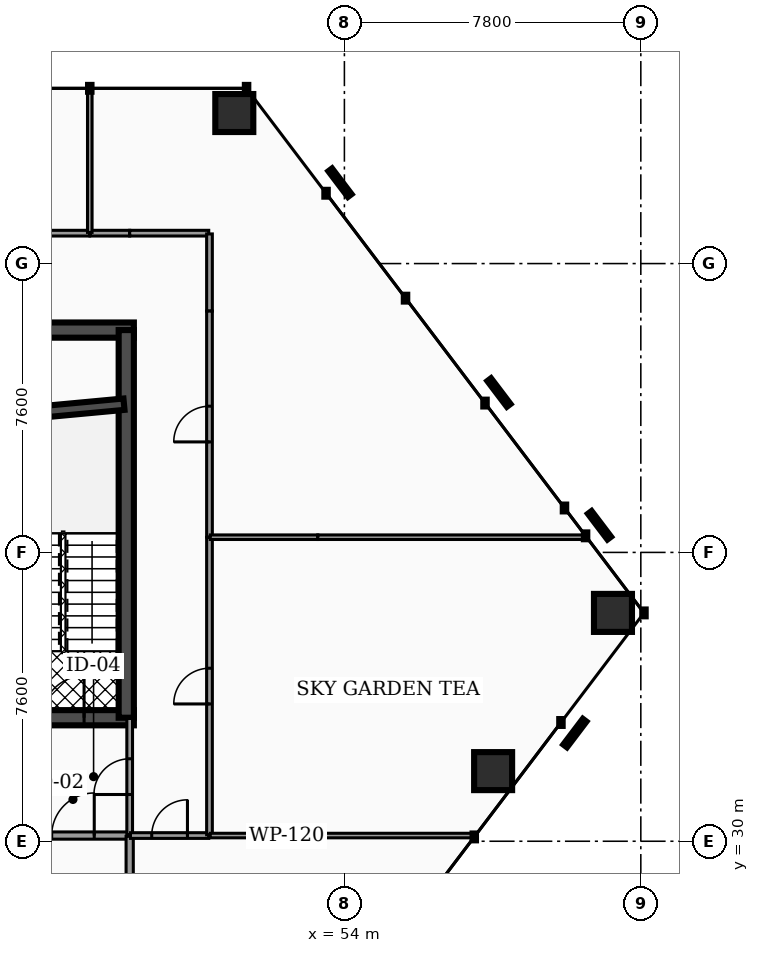
"""IFC4 building model, lengths in metres.
Left out: names, types, materials, properties, quantities, classifications, styles, units other than length and angle.
Written with IfcOpenShell. Run it as: python <this file> out.ifc"""

import sys

from ifc_helpers import new_model, si_unit, direction, frame, frame_2d, origin, origin_2d, place, context, subcontext, project, spatial, rectangle, hollow_rectangle, extrude, element, fill, save


model = new_model("IFC4")
c1 = context("Model", 3, precision=1e-05, world=origin(), true_north=direction((0.0, 1.0)))
c2 = subcontext(c1, "Body", "Model", "MODEL_VIEW")
j1 = project(units=[si_unit("LENGTHUNIT", "METRE"), si_unit("PLANEANGLEUNIT", "RADIAN")], contexts=[c1])
p1 = place(None, origin())
s1 = spatial("IfcSite", under=j1, at=p1, CompositionType="ELEMENT")
p2 = place(p1, origin())
s2 = spatial("IfcBuilding", under=s1, at=p2, CompositionType="ELEMENT")
p3 = place(p2, frame((0.0, 0.0, 64.26)))
s3 = spatial("IfcBuildingStorey", under=s2, at=p3, CompositionType="ELEMENT", Elevation=64.26)
p4 = place(p3, frame((28.4, 43.45, 0.0), z_axis=(0.0, 0.0, 1.0), x_axis=(1.0, 0.0, 0.0)))
e1 = element("IfcWall", 1, at=p4, inside=s3, PredefinedType="SHEAR", context=c2, shape_type="SweptSolid", body=[
    extrude(rectangle(XDim=20.06, YDim=0.4, at=frame_2d((10.03, 0.0))), origin(), (0.0, 0.0, 1.0), 3.82),
])
p5 = place(p3, frame((28.4, 33.25, 0.0), z_axis=(0.0, 0.0, 1.0), x_axis=(1.0, 0.0, 0.0)))
e2 = element("IfcWall", 2, at=p5, inside=s3, PredefinedType="SHEAR", context=c2, shape_type="SweptSolid", body=[
    extrude(rectangle(XDim=20.06, YDim=0.4, at=frame_2d((10.03, 0.0))), origin(), (0.0, 0.0, 1.0), 3.82),
])
p6 = place(p5, frame((4.03, 0.0, 0.0)))
e3 = element("IfcOpeningElement", 3, at=p6, cuts=e2, PredefinedType="OPENING", context=c2, shape_type="SweptSolid", body=[
    extrude(rectangle(XDim=1.1, YDim=2.15, at=frame_2d((0.55, 1.075))), frame((0.0, 0.21, 0.0), z_axis=(0.0, -1.0, 0.0), x_axis=(1.0, 0.0, 0.0)), (0.0, 0.0, 1.0), 0.42),
])
p7 = place(p5, frame((14.87, 0.0, 0.0)))
e4 = element("IfcOpeningElement", 4, at=p7, cuts=e2, PredefinedType="OPENING", context=c2, shape_type="SweptSolid", body=[
    extrude(rectangle(XDim=1.1, YDim=2.15, at=frame_2d((0.55, 1.075))), frame((0.0, 0.21, 0.0), z_axis=(0.0, -1.0, 0.0), x_axis=(1.0, 0.0, 0.0)), (0.0, 0.0, 1.0), 0.42),
])
p8 = place(p5, frame((1.31, 0.0, 0.0)))
e5 = element("IfcOpeningElement", 5, at=p8, cuts=e2, PredefinedType="OPENING", context=c2, shape_type="SweptSolid", body=[
    extrude(rectangle(XDim=1.1, YDim=2.2, at=frame_2d((0.55, 1.1))), frame((0.0, 0.21, 0.0), z_axis=(0.0, -1.0, 0.0), x_axis=(1.0, 0.0, 0.0)), (0.0, 0.0, 1.0), 0.42),
])
p9 = place(p5, frame((9.44, 0.0, 0.0)))
e6 = element("IfcOpeningElement", 6, at=p9, cuts=e2, PredefinedType="OPENING", context=c2, shape_type="SweptSolid", body=[
    extrude(rectangle(XDim=1.12, YDim=2.05, at=frame_2d((0.56, 1.025))), frame((0.0, 0.21, 0.0), z_axis=(0.0, -1.0, 0.0), x_axis=(1.0, 0.0, 0.0)), (0.0, 0.0, 1.0), 0.42),
])
p10 = place(p5, frame((17.65, 0.0, 0.0)))
e7 = element("IfcOpeningElement", 7, at=p10, cuts=e2, PredefinedType="OPENING", context=c2, shape_type="SweptSolid", body=[
    extrude(rectangle(XDim=1.1, YDim=2.2, at=frame_2d((0.55, 1.1))), frame((0.0, 0.21, 0.0), z_axis=(0.0, -1.0, 0.0), x_axis=(1.0, 0.0, 0.0)), (0.0, 0.0, 1.0), 0.42),
])
p11 = place(p3, frame((48.26, 33.25, 0.0), z_axis=(0.0, 0.0, 1.0), x_axis=(0.0, 1.0, 0.0)))
e8 = element("IfcWall", 8, at=p11, inside=s3, PredefinedType="SHEAR", context=c2, shape_type="SweptSolid", body=[
    extrude(rectangle(XDim=10.2, YDim=0.4, at=frame_2d((5.1, 0.0))), origin(), (0.0, 0.0, 1.0), 3.82),
])
p12 = place(p3, frame((44.98, 41.2, 0.0), z_axis=(0.0, 0.0, 1.0), x_axis=(0.995686468965, 0.09278176286, 0.0)))
e9 = element("IfcWall", 9, at=p12, inside=s3, PredefinedType="SHEAR", context=c2, shape_type="SweptSolid", body=[
    extrude(rectangle(XDim=3.234, YDim=0.3, at=frame_2d((1.617, 0.0))), origin(), (0.0, 0.0, 1.0), 3.82),
])
for number, where, z_axis, x_axis in (
    (10, (51.103, 49.161, 0.0), (0.0, 0.0, 1.0), (1.0, 0.0, 0.0)),
    (11, (57.914, 31.845, 0.0), (0.0, 0.0, 1.0), (1.0, 0.0, 0.0)),
    (12, (61.067, 36.008, 0.0), (0.0, 0.0, 1.0), (1.0, 0.0, 0.0)),
):
    element("IfcColumn", number, at=place(p3, frame(where, z_axis=z_axis, x_axis=x_axis)), inside=s3, PredefinedType="COLUMN", context=c2, shape_type="SweptSolid", body=[
        extrude(hollow_rectangle(XDim=1.0, YDim=1.0, WallThickness=0.05, at=origin_2d()), origin(), (0.0, 0.0, 1.0), 3.82),
    ])
p13 = place(p3, frame((45.385, 30.15, 0.0), z_axis=(0.0, 0.0, 1.0), x_axis=(1.0, 0.0, 0.0)))
e13 = element("IfcWall", 13, at=p13, inside=s3, PredefinedType="PARTITIONING", context=c2, shape_type="SweptSolid", body=[
    extrude(rectangle(XDim=2.945, YDim=0.19, at=frame_2d((1.473, 0.0))), origin(), (0.0, 0.0, 1.0), 2.777),
])
p14 = place(p13, frame((0.913, 0.0, 0.0)))
e14 = element("IfcOpeningElement", 14, at=p14, cuts=e13, PredefinedType="OPENING", context=c2, shape_type="SweptSolid", body=[
    extrude(rectangle(XDim=1.12, YDim=2.05, at=frame_2d((0.56, 1.025))), frame((0.0, 0.105, 0.0), z_axis=(0.0, -1.0, 0.0), x_axis=(1.0, 0.0, 0.0)), (0.0, 0.0, 1.0), 0.21),
])
p15 = place(p3, frame((48.35, 30.17, 0.0), z_axis=(0.0, 0.0, 1.0), x_axis=(0.0, 1.0, 0.0)))
e15 = element("IfcWall", 15, at=p15, inside=s3, PredefinedType="PARTITIONING", context=c2, shape_type="SweptSolid", body=[
    extrude(rectangle(XDim=3.06, YDim=0.15, at=frame_2d((1.53, 0.0))), origin(), (0.0, 0.0, 1.0), 2.777),
])
p16 = place(p15, frame((1.06, 0.0, 0.0)))
e16 = element("IfcOpeningElement", 16, at=p16, cuts=e15, PredefinedType="OPENING", context=c2, shape_type="SweptSolid", body=[
    extrude(rectangle(XDim=0.94, YDim=2.05, at=frame_2d((0.47, 1.025))), frame((0.0, 0.085, 0.0), z_axis=(0.0, -1.0, 0.0), x_axis=(1.0, 0.0, 0.0)), (0.0, 0.0, 1.0), 0.17),
])
p17 = place(p3, frame((48.35, 27.37, 0.0), z_axis=(0.0, 0.0, 1.0), x_axis=(0.0, 1.0, 0.0)))
e17 = element("IfcWall", 17, at=p17, inside=s3, PredefinedType="PARTITIONING", context=c2, shape_type="SweptSolid", body=[
    extrude(rectangle(XDim=2.76, YDim=0.19, at=frame_2d((1.38, 0.0))), origin(), (0.0, 0.0, 1.0), 2.777),
])
p18 = place(p3, frame((48.37, 30.15, 0.0), z_axis=(0.0, 0.0, 1.0), x_axis=(1.0, 0.0, 0.0)))
e18 = element("IfcWall", 18, at=p18, inside=s3, PredefinedType="PARTITIONING", context=c2, shape_type="SweptSolid", body=[
    extrude(rectangle(XDim=2.06, YDim=0.15, at=frame_2d((1.03, 0.0))), origin(), (0.0, 0.0, 1.0), 2.777),
])
p19 = place(p18, frame((0.56, 0.0, 0.0)))
e19 = element("IfcOpeningElement", 19, at=p19, cuts=e18, PredefinedType="OPENING", context=c2, shape_type="SweptSolid", body=[
    extrude(rectangle(XDim=0.94, YDim=2.05, at=frame_2d((0.47, 1.025))), frame((0.0, 0.085, 0.0), z_axis=(0.0, -1.0, 0.0), x_axis=(1.0, 0.0, 0.0)), (0.0, 0.0, 1.0), 0.17),
])
p20 = place(p3, frame((50.45, 30.17, 0.0), z_axis=(0.0, 0.0, 1.0), x_axis=(0.0, 1.0, 0.0)))
e20 = element("IfcWall", 20, at=p20, inside=s3, PredefinedType="PARTITIONING", context=c2, shape_type="SweptSolid", body=[
    extrude(rectangle(XDim=7.825, YDim=0.15, at=frame_2d((3.913, 0.0))), origin(), (0.0, 0.0, 1.0), 2.777),
])
p21 = place(p20, frame((3.442, 0.0, 0.0)))
e21 = element("IfcOpeningElement", 21, at=p21, cuts=e20, PredefinedType="OPENING", context=c2, shape_type="SweptSolid", body=[
    extrude(rectangle(XDim=0.94, YDim=2.05, at=frame_2d((0.47, 1.025))), frame((0.0, 0.085, 0.0), z_axis=(0.0, -1.0, 0.0), x_axis=(1.0, 0.0, 0.0)), (0.0, 0.0, 1.0), 0.17),
])
p22 = place(p3, frame((47.305, 46.0, 0.0), z_axis=(0.0, 0.0, 1.0), x_axis=(1.0, 0.0, 0.0)))
e22 = element("IfcWall", 22, at=p22, inside=s3, PredefinedType="PARTITIONING", context=c2, shape_type="SweptSolid", body=[
    extrude(rectangle(XDim=1.045, YDim=0.15, at=frame_2d((0.522, 0.0))), origin(), (0.0, 0.0, 1.0), 2.777),
])
p23 = place(p3, frame((48.35, 46.0, 0.0), z_axis=(0.0, 0.0, 1.0), x_axis=(1.0, 0.0, 0.0)))
e23 = element("IfcWall", 23, at=p23, inside=s3, PredefinedType="PARTITIONING", context=c2, shape_type="SweptSolid", body=[
    extrude(rectangle(XDim=2.08, YDim=0.15, at=frame_2d((1.04, 0.0))), origin(), (0.0, 0.0, 1.0), 2.777),
])
p24 = place(p3, frame((50.45, 43.95, 0.0), z_axis=(0.0, 0.0, 1.0), x_axis=(0.0, 1.0, 0.0)))
e24 = element("IfcWall", 24, at=p24, inside=s3, PredefinedType="PARTITIONING", context=c2, shape_type="SweptSolid", body=[
    extrude(rectangle(XDim=2.03, YDim=0.15, at=frame_2d((1.015, 0.0))), origin(), (0.0, 0.0, 1.0), 2.777),
])
p25 = place(p3, frame((50.45, 38.005, 0.0), z_axis=(0.0, 0.0, 1.0), x_axis=(0.0, 1.0, 0.0)))
e25 = element("IfcWall", 25, at=p25, inside=s3, PredefinedType="PARTITIONING", context=c2, shape_type="SweptSolid", body=[
    extrude(rectangle(XDim=5.945, YDim=0.15, at=frame_2d((2.973, 0.0))), origin(), (0.0, 0.0, 1.0), 2.777),
])
p26 = place(p25, frame((2.502, 0.0, 0.0)))
e26 = element("IfcOpeningElement", 26, at=p26, cuts=e25, PredefinedType="OPENING", context=c2, shape_type="SweptSolid", body=[
    extrude(rectangle(XDim=0.94, YDim=2.05, at=frame_2d((0.47, 1.025))), frame((0.0, 0.085, 0.0), z_axis=(0.0, -1.0, 0.0), x_axis=(1.0, 0.0, 0.0)), (0.0, 0.0, 1.0), 0.17),
])
p27 = place(p3, frame((42.605, 46.0, 0.0), z_axis=(0.0, 0.0, 1.0), x_axis=(1.0, 0.0, 0.0)))
e27 = element("IfcWall", 27, at=p27, inside=s3, PredefinedType="PARTITIONING", context=c2, shape_type="SweptSolid", body=[
    extrude(rectangle(XDim=4.69, YDim=0.15, at=frame_2d((2.345, 0.0))), origin(), (0.0, 0.0, 1.0), 2.777),
])
p28 = place(p27, frame((1.875, 0.0, 0.0)))
e28 = element("IfcOpeningElement", 28, at=p28, cuts=e27, PredefinedType="OPENING", context=c2, shape_type="SweptSolid", body=[
    extrude(rectangle(XDim=0.94, YDim=2.05, at=frame_2d((0.47, 1.025))), frame((0.0, 0.085, 0.0), z_axis=(0.0, -1.0, 0.0), x_axis=(1.0, 0.0, 0.0)), (0.0, 0.0, 1.0), 0.17),
])
p29 = place(p3, frame((50.47, 30.15, 0.0), z_axis=(0.0, 0.0, 1.0), x_axis=(1.0, 0.0, 0.0)))
e29 = element("IfcWall", 29, at=p29, inside=s3, PredefinedType="PARTITIONING", context=c2, shape_type="SweptSolid", body=[
    extrude(rectangle(XDim=2.83, YDim=0.12, at=frame_2d((1.415, 0.0))), origin(), (0.0, 0.0, 1.0), 2.777),
])
p30 = place(p3, frame((53.3, 30.15, 0.0), z_axis=(0.0, 0.0, 1.0), x_axis=(1.0, 0.0, 0.0)))
e30 = element("IfcWall", 30, at=p30, inside=s3, PredefinedType="PARTITIONING", context=c2, shape_type="SweptSolid", body=[
    extrude(rectangle(XDim=4.13, YDim=0.12, at=frame_2d((2.065, 0.0))), origin(), (0.0, 0.0, 1.0), 2.777),
])
p31 = place(p3, frame((50.47, 38.0, 0.0), z_axis=(0.0, 0.0, 1.0), x_axis=(1.0, 0.0, 0.0)))
e31 = element("IfcWall", 31, at=p31, inside=s3, PredefinedType="PARTITIONING", context=c2, shape_type="SweptSolid", body=[
    extrude(rectangle(XDim=2.83, YDim=0.12, at=frame_2d((1.415, 0.0))), origin(), (0.0, 0.0, 1.0), 2.777),
])
p32 = place(p3, frame((53.3, 38.0, 0.0), z_axis=(0.0, 0.0, 1.0), x_axis=(1.0, 0.0, 0.0)))
e32 = element("IfcWall", 32, at=p32, inside=s3, PredefinedType="PARTITIONING", context=c2, shape_type="SweptSolid", body=[
    extrude(rectangle(XDim=7.059, YDim=0.12, at=frame_2d((3.529, 0.0))), origin(), (0.0, 0.0, 1.0), 2.777),
])
p33 = place(p3, frame((47.3, 46.02, 0.0), z_axis=(0.0, 0.0, 1.0), x_axis=(0.0, 1.0, 0.0)))
e33 = element("IfcWall", 33, at=p33, inside=s3, PredefinedType="PARTITIONING", context=c2, shape_type="SweptSolid", body=[
    extrude(rectangle(XDim=3.776, YDim=0.12, at=frame_2d((1.888, 0.0))), origin(), (0.0, 0.0, 1.0), 2.777),
])
p34 = place(p10, origin())
e34 = element("IfcDoor", 34, at=p34, inside=s3, OperationType="SINGLE_SWING_RIGHT", PredefinedType="DOOR", context=c2, shape_type="SweptSolid", body=[
    extrude(rectangle(XDim=1.1, YDim=2.2, at=frame_2d((0.55, 1.1))), frame((0.0, 0.025, 0.0), z_axis=(0.0, -1.0, 0.0), x_axis=(1.0, 0.0, 0.0)), (0.0, 0.0, 1.0), 0.05),
])
fill(e7, e34)
p35 = place(p14, origin())
e35 = element("IfcDoor", 35, at=p35, inside=s3, OperationType="SINGLE_SWING_RIGHT", PredefinedType="DOOR", context=c2, shape_type="SweptSolid", body=[
    extrude(rectangle(XDim=1.12, YDim=2.05, at=frame_2d((0.56, 1.025))), frame((0.0, 0.025, 0.0), z_axis=(0.0, -1.0, 0.0), x_axis=(1.0, 0.0, 0.0)), (0.0, 0.0, 1.0), 0.05),
])
fill(e14, e35)
p36 = place(p16, origin())
e36 = element("IfcDoor", 36, at=p36, inside=s3, OperationType="SINGLE_SWING_LEFT", PredefinedType="DOOR", context=c2, shape_type="SweptSolid", body=[
    extrude(rectangle(XDim=0.94, YDim=2.05, at=frame_2d((0.47, 1.025))), frame((0.0, 0.025, 0.0), z_axis=(0.0, -1.0, 0.0), x_axis=(1.0, 0.0, 0.0)), (0.0, 0.0, 1.0), 0.05),
])
fill(e16, e36)
p37 = place(p19, origin())
e37 = element("IfcDoor", 37, at=p37, inside=s3, OperationType="SINGLE_SWING_RIGHT", PredefinedType="DOOR", context=c2, shape_type="SweptSolid", body=[
    extrude(rectangle(XDim=0.94, YDim=2.05, at=frame_2d((0.47, 1.025))), frame((0.0, 0.025, 0.0), z_axis=(0.0, -1.0, 0.0), x_axis=(1.0, 0.0, 0.0)), (0.0, 0.0, 1.0), 0.05),
])
fill(e19, e37)
p38 = place(p21, origin())
e38 = element("IfcDoor", 38, at=p38, inside=s3, OperationType="SINGLE_SWING_LEFT", PredefinedType="DOOR", context=c2, shape_type="SweptSolid", body=[
    extrude(rectangle(XDim=0.94, YDim=2.05, at=frame_2d((0.47, 1.025))), frame((0.0, 0.025, 0.0), z_axis=(0.0, -1.0, 0.0), x_axis=(1.0, 0.0, 0.0)), (0.0, 0.0, 1.0), 0.05),
])
fill(e21, e38)
p39 = place(p26, origin())
e39 = element("IfcDoor", 39, at=p39, inside=s3, OperationType="SINGLE_SWING_LEFT", PredefinedType="DOOR", context=c2, shape_type="SweptSolid", body=[
    extrude(rectangle(XDim=0.94, YDim=2.05, at=frame_2d((0.47, 1.025))), frame((0.0, 0.025, 0.0), z_axis=(0.0, -1.0, 0.0), x_axis=(1.0, 0.0, 0.0)), (0.0, 0.0, 1.0), 0.05),
])
fill(e26, e39)
save(model, sys.argv[1])
